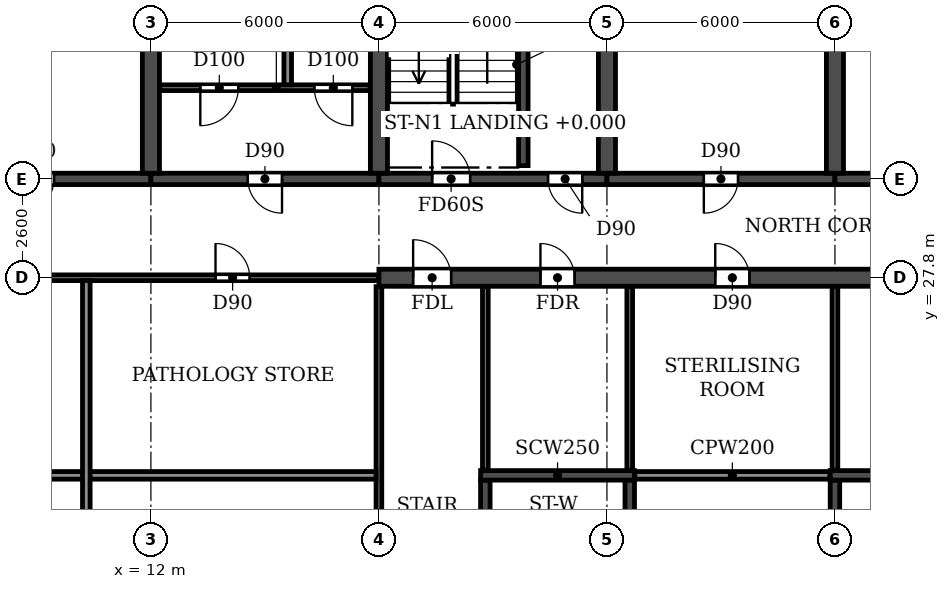
"""IFC4 building model, lengths in metres.
Left out: names, types, materials, properties, quantities, classifications, styles, units other than length and angle.
Written with IfcOpenShell. Run it as: python <this file> out.ifc"""

import sys

from ifc_helpers import new_model, si_unit, direction, frame, frame_2d, origin, place, context, subcontext, project, spatial, rectangle, extrude, element, fill, save


model = new_model("IFC4")
c1 = context("Model", 3, precision=1e-05, world=origin(), true_north=direction((0.0, 1.0)))
c2 = subcontext(c1, "Body", "Model", "MODEL_VIEW")
j1 = project(units=[si_unit("LENGTHUNIT", "METRE"), si_unit("PLANEANGLEUNIT", "RADIAN")], contexts=[c1])
p1 = place(None, origin())
s1 = spatial("IfcSite", under=j1, at=p1, CompositionType="ELEMENT")
p2 = place(p1, origin())
s2 = spatial("IfcBuilding", under=s1, at=p2, CompositionType="ELEMENT")
p3 = place(p2, frame((0.0, 0.0, 6.0)))
s3 = spatial("IfcBuildingStorey", under=s2, at=p3, CompositionType="ELEMENT", Elevation=6.0)
for number, where, z_axis, x_axis in (
    (1, (12.0, 30.55, 0.0), (0.0, 0.0, 1.0), (0.0, 1.0, 0.0)),
    (2, (18.0, 30.55, 0.0), (0.0, 0.0, 1.0), (0.0, 1.0, 0.0)),
    (3, (24.0, 30.55, 0.0), (0.0, 0.0, 1.0), (0.0, 1.0, 0.0)),
    (4, (30.0, 30.55, 0.0), (0.0, 0.0, 1.0), (0.0, 1.0, 0.0)),
):
    element("IfcWall", number, at=place(p3, frame(where, z_axis=z_axis, x_axis=x_axis)), inside=s3, PredefinedType="SHEAR", context=c2, shape_type="SweptSolid", body=[
        extrude(rectangle(XDim=14.05, YDim=0.45, at=frame_2d((7.025, 0.0))), origin(), (0.0, 0.0, 1.0), 4.52),
    ])
p4 = place(p3, frame((6.0, 30.4, 0.0), z_axis=(0.0, 0.0, 1.0), x_axis=(1.0, 0.0, 0.0)))
e5 = element("IfcWall", 5, at=p4, inside=s3, PredefinedType="SHEAR", context=c2, shape_type="SweptSolid", body=[
    extrude(rectangle(XDim=6.0, YDim=0.3, at=frame_2d((3.0, 0.0))), origin(), (0.0, 0.0, 1.0), 3.92),
])
p5 = place(p4, frame((2.55, 0.0, 0.0)))
e6 = element("IfcOpeningElement", 6, at=p5, cuts=e5, PredefinedType="OPENING", context=c2, shape_type="SweptSolid", body=[
    extrude(rectangle(XDim=0.9, YDim=2.1, at=frame_2d((0.45, 1.05))), frame((0.0, 0.16, 0.0), z_axis=(0.0, -1.0, 0.0), x_axis=(1.0, 0.0, 0.0)), (0.0, 0.0, 1.0), 0.32),
])
p6 = place(p3, frame((12.0, 30.4, 0.0), z_axis=(0.0, 0.0, 1.0), x_axis=(1.0, 0.0, 0.0)))
e7 = element("IfcWall", 7, at=p6, inside=s3, PredefinedType="SHEAR", context=c2, shape_type="SweptSolid", body=[
    extrude(rectangle(XDim=6.0, YDim=0.3, at=frame_2d((3.0, 0.0))), origin(), (0.0, 0.0, 1.0), 3.92),
])
p7 = place(p6, frame((2.55, 0.0, 0.0)))
e8 = element("IfcOpeningElement", 8, at=p7, cuts=e7, PredefinedType="OPENING", context=c2, shape_type="SweptSolid", body=[
    extrude(rectangle(XDim=0.9, YDim=2.1, at=frame_2d((0.45, 1.05))), frame((0.0, 0.16, 0.0), z_axis=(0.0, -1.0, 0.0), x_axis=(1.0, 0.0, 0.0)), (0.0, 0.0, 1.0), 0.32),
])
p8 = place(p3, frame((18.0, 30.4, 0.0), z_axis=(0.0, 0.0, 1.0), x_axis=(1.0, 0.0, 0.0)))
e9 = element("IfcWall", 9, at=p8, inside=s3, PredefinedType="SHEAR", context=c2, shape_type="SweptSolid", body=[
    extrude(rectangle(XDim=6.0, YDim=0.3, at=frame_2d((3.0, 0.0))), origin(), (0.0, 0.0, 1.0), 3.92),
])
p9 = place(p8, frame((1.4, 0.0, 0.0)))
e10 = element("IfcOpeningElement", 10, at=p9, cuts=e9, PredefinedType="OPENING", context=c2, shape_type="SweptSolid", body=[
    extrude(rectangle(XDim=1.0, YDim=2.1, at=frame_2d((0.5, 1.05))), frame((0.0, 0.16, 0.0), z_axis=(0.0, -1.0, 0.0), x_axis=(1.0, 0.0, 0.0)), (0.0, 0.0, 1.0), 0.32),
])
p10 = place(p8, frame((4.45, 0.0, 0.0)))
e11 = element("IfcOpeningElement", 11, at=p10, cuts=e9, PredefinedType="OPENING", context=c2, shape_type="SweptSolid", body=[
    extrude(rectangle(XDim=0.9, YDim=2.1, at=frame_2d((0.45, 1.05))), frame((0.0, 0.16, 0.0), z_axis=(0.0, -1.0, 0.0), x_axis=(1.0, 0.0, 0.0)), (0.0, 0.0, 1.0), 0.32),
])
p11 = place(p3, frame((24.0, 30.4, 0.0), z_axis=(0.0, 0.0, 1.0), x_axis=(1.0, 0.0, 0.0)))
e12 = element("IfcWall", 12, at=p11, inside=s3, PredefinedType="SHEAR", context=c2, shape_type="SweptSolid", body=[
    extrude(rectangle(XDim=6.0, YDim=0.3, at=frame_2d((3.0, 0.0))), origin(), (0.0, 0.0, 1.0), 3.92),
])
p12 = place(p11, frame((2.55, 0.0, 0.0)))
e13 = element("IfcOpeningElement", 13, at=p12, cuts=e12, PredefinedType="OPENING", context=c2, shape_type="SweptSolid", body=[
    extrude(rectangle(XDim=0.9, YDim=2.1, at=frame_2d((0.45, 1.05))), frame((0.0, 0.16, 0.0), z_axis=(0.0, -1.0, 0.0), x_axis=(1.0, 0.0, 0.0)), (0.0, 0.0, 1.0), 0.32),
])
p13 = place(p3, frame((30.0, 30.4, 0.0), z_axis=(0.0, 0.0, 1.0), x_axis=(1.0, 0.0, 0.0)))
e14 = element("IfcWall", 14, at=p13, inside=s3, PredefinedType="SHEAR", context=c2, shape_type="SweptSolid", body=[
    extrude(rectangle(XDim=6.0, YDim=0.3, at=frame_2d((3.0, 0.0))), origin(), (0.0, 0.0, 1.0), 3.92),
])
p14 = place(p13, frame((2.55, 0.0, 0.0)))
e15 = element("IfcOpeningElement", 15, at=p14, cuts=e14, PredefinedType="OPENING", context=c2, shape_type="SweptSolid", body=[
    extrude(rectangle(XDim=0.9, YDim=2.1, at=frame_2d((0.45, 1.05))), frame((0.0, 0.16, 0.0), z_axis=(0.0, -1.0, 0.0), x_axis=(1.0, 0.0, 0.0)), (0.0, 0.0, 1.0), 0.32),
])
p15 = place(p3, frame((18.0, 27.8, 0.0), z_axis=(0.0, 0.0, 1.0), x_axis=(1.0, 0.0, 0.0)))
e16 = element("IfcWall", 16, at=p15, inside=s3, PredefinedType="SOLIDWALL", context=c2, shape_type="SweptSolid", body=[
    extrude(rectangle(XDim=66.0, YDim=0.45, at=frame_2d((33.0, 0.0))), origin(), (0.0, 0.0, 1.0), 4.52),
])
p16 = place(p15, frame((0.9, 0.0, 0.0)))
e17 = element("IfcOpeningElement", 17, at=p16, cuts=e16, PredefinedType="OPENING", context=c2, shape_type="SweptSolid", body=[
    extrude(rectangle(XDim=1.0, YDim=2.1, at=frame_2d((0.5, 1.05))), frame((0.0, 0.235, 0.0), z_axis=(0.0, -1.0, 0.0), x_axis=(1.0, 0.0, 0.0)), (0.0, 0.0, 1.0), 0.47),
])
p17 = place(p15, frame((4.25, 0.0, 0.0)))
e18 = element("IfcOpeningElement", 18, at=p17, cuts=e16, PredefinedType="OPENING", context=c2, shape_type="SweptSolid", body=[
    extrude(rectangle(XDim=0.9, YDim=2.1, at=frame_2d((0.45, 1.05))), frame((0.0, 0.235, 0.0), z_axis=(0.0, -1.0, 0.0), x_axis=(1.0, 0.0, 0.0)), (0.0, 0.0, 1.0), 0.47),
])
p18 = place(p15, frame((8.85, 0.0, 0.0)))
e19 = element("IfcOpeningElement", 19, at=p18, cuts=e16, PredefinedType="OPENING", context=c2, shape_type="SweptSolid", body=[
    extrude(rectangle(XDim=0.9, YDim=2.1, at=frame_2d((0.45, 1.05))), frame((0.0, 0.235, 0.0), z_axis=(0.0, -1.0, 0.0), x_axis=(1.0, 0.0, 0.0)), (0.0, 0.0, 1.0), 0.47),
])
p19 = place(p15, frame((13.45, 0.0, 0.0)))
e20 = element("IfcOpeningElement", 20, at=p19, cuts=e16, PredefinedType="OPENING", context=c2, shape_type="SweptSolid", body=[
    extrude(rectangle(XDim=0.9, YDim=2.1, at=frame_2d((0.45, 1.05))), frame((0.0, 0.235, 0.0), z_axis=(0.0, -1.0, 0.0), x_axis=(1.0, 0.0, 0.0)), (0.0, 0.0, 1.0), 0.47),
])
p20 = place(p15, frame((17.9, 0.0, 0.0)))
e21 = element("IfcOpeningElement", 21, at=p20, cuts=e16, PredefinedType="OPENING", context=c2, shape_type="SweptSolid", body=[
    extrude(rectangle(XDim=1.0, YDim=2.1, at=frame_2d((0.5, 1.05))), frame((0.0, 0.235, 0.0), z_axis=(0.0, -1.0, 0.0), x_axis=(1.0, 0.0, 0.0)), (0.0, 0.0, 1.0), 0.47),
])
p21 = place(p15, frame((23.1, 0.0, 0.0)))
e22 = element("IfcOpeningElement", 22, at=p21, cuts=e16, PredefinedType="OPENING", context=c2, shape_type="SweptSolid", body=[
    extrude(rectangle(XDim=1.0, YDim=2.1, at=frame_2d((0.5, 1.05))), frame((0.0, 0.235, 0.0), z_axis=(0.0, -1.0, 0.0), x_axis=(1.0, 0.0, 0.0)), (0.0, 0.0, 1.0), 0.47),
])
p22 = place(p15, frame((29.6, 0.0, 0.0)))
e23 = element("IfcOpeningElement", 23, at=p22, cuts=e16, PredefinedType="OPENING", context=c2, shape_type="SweptSolid", body=[
    extrude(rectangle(XDim=1.0, YDim=2.1, at=frame_2d((0.5, 1.05))), frame((0.0, 0.235, 0.0), z_axis=(0.0, -1.0, 0.0), x_axis=(1.0, 0.0, 0.0)), (0.0, 0.0, 1.0), 0.47),
])
p23 = place(p15, frame((32.5, 0.0, 0.0)))
e24 = element("IfcOpeningElement", 24, at=p23, cuts=e16, PredefinedType="OPENING", context=c2, shape_type="SweptSolid", body=[
    extrude(rectangle(XDim=1.0, YDim=2.1, at=frame_2d((0.5, 1.05))), frame((0.0, 0.235, 0.0), z_axis=(0.0, -1.0, 0.0), x_axis=(1.0, 0.0, 0.0)), (0.0, 0.0, 1.0), 0.47),
])
p24 = place(p15, frame((38.0, 0.0, 0.0)))
e25 = element("IfcOpeningElement", 25, at=p24, cuts=e16, PredefinedType="OPENING", context=c2, shape_type="SweptSolid", body=[
    extrude(rectangle(XDim=1.0, YDim=2.1, at=frame_2d((0.5, 1.05))), frame((0.0, 0.235, 0.0), z_axis=(0.0, -1.0, 0.0), x_axis=(1.0, 0.0, 0.0)), (0.0, 0.0, 1.0), 0.47),
])
p25 = place(p15, frame((43.2, 0.0, 0.0)))
e26 = element("IfcOpeningElement", 26, at=p25, cuts=e16, PredefinedType="OPENING", context=c2, shape_type="SweptSolid", body=[
    extrude(rectangle(XDim=1.0, YDim=2.1, at=frame_2d((0.5, 1.05))), frame((0.0, 0.235, 0.0), z_axis=(0.0, -1.0, 0.0), x_axis=(1.0, 0.0, 0.0)), (0.0, 0.0, 1.0), 0.47),
])
p26 = place(p15, frame((45.8, 0.0, 0.0)))
e27 = element("IfcOpeningElement", 27, at=p26, cuts=e16, PredefinedType="OPENING", context=c2, shape_type="SweptSolid", body=[
    extrude(rectangle(XDim=1.0, YDim=2.1, at=frame_2d((0.5, 1.05))), frame((0.0, 0.235, 0.0), z_axis=(0.0, -1.0, 0.0), x_axis=(1.0, 0.0, 0.0)), (0.0, 0.0, 1.0), 0.47),
])
p27 = place(p15, frame((48.4, 0.0, 0.0)))
e28 = element("IfcOpeningElement", 28, at=p27, cuts=e16, PredefinedType="OPENING", context=c2, shape_type="SweptSolid", body=[
    extrude(rectangle(XDim=1.0, YDim=2.1, at=frame_2d((0.5, 1.05))), frame((0.0, 0.235, 0.0), z_axis=(0.0, -1.0, 0.0), x_axis=(1.0, 0.0, 0.0)), (0.0, 0.0, 1.0), 0.47),
])
p28 = place(p15, frame((51.65, 0.0, 0.0)))
e29 = element("IfcOpeningElement", 29, at=p28, cuts=e16, PredefinedType="OPENING", context=c2, shape_type="SweptSolid", body=[
    extrude(rectangle(XDim=0.9, YDim=2.1, at=frame_2d((0.45, 1.05))), frame((0.0, 0.235, 0.0), z_axis=(0.0, -1.0, 0.0), x_axis=(1.0, 0.0, 0.0)), (0.0, 0.0, 1.0), 0.47),
])
p29 = place(p15, frame((56.25, 0.0, 0.0)))
e30 = element("IfcOpeningElement", 30, at=p29, cuts=e16, PredefinedType="OPENING", context=c2, shape_type="SweptSolid", body=[
    extrude(rectangle(XDim=0.9, YDim=2.1, at=frame_2d((0.45, 1.05))), frame((0.0, 0.235, 0.0), z_axis=(0.0, -1.0, 0.0), x_axis=(1.0, 0.0, 0.0)), (0.0, 0.0, 1.0), 0.47),
])
p30 = place(p15, frame((60.85, 0.0, 0.0)))
e31 = element("IfcOpeningElement", 31, at=p30, cuts=e16, PredefinedType="OPENING", context=c2, shape_type="SweptSolid", body=[
    extrude(rectangle(XDim=0.9, YDim=2.1, at=frame_2d((0.45, 1.05))), frame((0.0, 0.235, 0.0), z_axis=(0.0, -1.0, 0.0), x_axis=(1.0, 0.0, 0.0)), (0.0, 0.0, 1.0), 0.47),
])
p31 = place(p15, frame((64.1, 0.0, 0.0)))
e32 = element("IfcOpeningElement", 32, at=p31, cuts=e16, PredefinedType="OPENING", context=c2, shape_type="SweptSolid", body=[
    extrude(rectangle(XDim=1.0, YDim=2.1, at=frame_2d((0.5, 1.05))), frame((0.0, 0.235, 0.0), z_axis=(0.0, -1.0, 0.0), x_axis=(1.0, 0.0, 0.0)), (0.0, 0.0, 1.0), 0.47),
])
p32 = place(p3, frame((30.0, 14.825, 0.0), z_axis=(0.0, 0.0, 1.0), x_axis=(0.0, 1.0, 0.0)))
e33 = element("IfcWall", 33, at=p32, inside=s3, PredefinedType="SOLIDWALL", context=c2, shape_type="SweptSolid", body=[
    extrude(rectangle(XDim=7.65, YDim=0.25, at=frame_2d((3.825, 0.0))), origin(), (0.0, 0.0, 1.0), 4.52),
])
p33 = place(p3, frame((29.875, 22.6, 0.0), z_axis=(0.0, 0.0, 1.0), x_axis=(1.0, 0.0, 0.0)))
e34 = element("IfcWall", 34, at=p33, inside=s3, PredefinedType="SOLIDWALL", context=c2, shape_type="SweptSolid", body=[
    extrude(rectangle(XDim=4.05, YDim=0.25, at=frame_2d((2.025, 0.0))), origin(), (0.0, 0.0, 1.0), 4.52),
])
p34 = place(p3, frame((20.8, 14.825, 0.0), z_axis=(0.0, 0.0, 1.0), x_axis=(0.0, 1.0, 0.0)))
e35 = element("IfcWall", 35, at=p34, inside=s3, PredefinedType="SOLIDWALL", context=c2, shape_type="SweptSolid", body=[
    extrude(rectangle(XDim=7.65, YDim=0.25, at=frame_2d((3.825, 0.0))), origin(), (0.0, 0.0, 1.0), 4.52),
])
p35 = place(p34, frame((0.475, 0.0, 0.0)))
e36 = element("IfcOpeningElement", 36, at=p35, cuts=e35, PredefinedType="OPENING", context=c2, shape_type="SweptSolid", body=[
    extrude(rectangle(XDim=1.0, YDim=2.1, at=frame_2d((0.5, 1.05))), frame((0.0, 0.135, 0.0), z_axis=(0.0, -1.0, 0.0), x_axis=(1.0, 0.0, 0.0)), (0.0, 0.0, 1.0), 0.27),
])
p36 = place(p3, frame((24.6, 14.825, 0.0), z_axis=(0.0, 0.0, 1.0), x_axis=(0.0, 1.0, 0.0)))
e37 = element("IfcWall", 37, at=p36, inside=s3, PredefinedType="SOLIDWALL", context=c2, shape_type="SweptSolid", body=[
    extrude(rectangle(XDim=7.65, YDim=0.25, at=frame_2d((3.825, 0.0))), origin(), (0.0, 0.0, 1.0), 4.52),
])
p37 = place(p3, frame((20.675, 22.6, 0.0), z_axis=(0.0, 0.0, 1.0), x_axis=(1.0, 0.0, 0.0)))
e38 = element("IfcWall", 38, at=p37, inside=s3, PredefinedType="SOLIDWALL", context=c2, shape_type="SweptSolid", body=[
    extrude(rectangle(XDim=4.05, YDim=0.25, at=frame_2d((2.025, 0.0))), origin(), (0.0, 0.0, 1.0), 4.52),
])
p38 = place(p3, frame((21.8, 30.75, 0.0), z_axis=(0.0, 0.0, 1.0), x_axis=(0.0, 1.0, 0.0)))
e39 = element("IfcWall", 39, at=p38, inside=s3, PredefinedType="SOLIDWALL", context=c2, shape_type="SweptSolid", body=[
    extrude(rectangle(XDim=7.525, YDim=0.25, at=frame_2d((3.762, 0.0))), origin(), (0.0, 0.0, 1.0), 4.52),
])
p39 = place(p3, frame((2.525, 27.8, 0.0), z_axis=(0.0, 0.0, 1.0), x_axis=(1.0, 0.0, 0.0)))
e40 = element("IfcWall", 40, at=p39, inside=s3, PredefinedType="PARTITIONING", context=c2, shape_type="SweptSolid", body=[
    extrude(rectangle(XDim=15.465, YDim=0.15, at=frame_2d((7.732, 0.0))), origin(), (0.0, 0.0, 1.0), 4.52),
])
p40 = place(p39, frame((3.475, 0.0, 0.0)))
e41 = element("IfcOpeningElement", 41, at=p40, cuts=e40, PredefinedType="OPENING", context=c2, shape_type="SweptSolid", body=[
    extrude(rectangle(XDim=0.9, YDim=2.1, at=frame_2d((0.45, 1.05))), frame((0.0, 0.085, 0.0), z_axis=(0.0, -1.0, 0.0), x_axis=(1.0, 0.0, 0.0)), (0.0, 0.0, 1.0), 0.17),
])
p41 = place(p39, frame((11.175, 0.0, 0.0)))
e42 = element("IfcOpeningElement", 42, at=p41, cuts=e40, PredefinedType="OPENING", context=c2, shape_type="SweptSolid", body=[
    extrude(rectangle(XDim=0.9, YDim=2.1, at=frame_2d((0.45, 1.05))), frame((0.0, 0.085, 0.0), z_axis=(0.0, -1.0, 0.0), x_axis=(1.0, 0.0, 0.0)), (0.0, 0.0, 1.0), 0.17),
])
p42 = place(p3, frame((12.235, 32.8, 0.0), z_axis=(0.0, 0.0, 1.0), x_axis=(1.0, 0.0, 0.0)))
e43 = element("IfcWall", 43, at=p42, inside=s3, PredefinedType="PARTITIONING", context=c2, shape_type="SweptSolid", body=[
    extrude(rectangle(XDim=5.53, YDim=0.15, at=frame_2d((2.765, 0.0))), origin(), (0.0, 0.0, 1.0), 4.52),
])
p43 = place(p42, frame((1.065, 0.0, 0.0)))
e44 = element("IfcOpeningElement", 44, at=p43, cuts=e43, PredefinedType="OPENING", context=c2, shape_type="SweptSolid", body=[
    extrude(rectangle(XDim=1.0, YDim=2.1, at=frame_2d((0.5, 1.05))), frame((0.0, 0.085, 0.0), z_axis=(0.0, -1.0, 0.0), x_axis=(1.0, 0.0, 0.0)), (0.0, 0.0, 1.0), 0.17),
])
p44 = place(p42, frame((4.065, 0.0, 0.0)))
e45 = element("IfcOpeningElement", 45, at=p44, cuts=e43, PredefinedType="OPENING", context=c2, shape_type="SweptSolid", body=[
    extrude(rectangle(XDim=1.0, YDim=2.1, at=frame_2d((0.5, 1.05))), frame((0.0, 0.085, 0.0), z_axis=(0.0, -1.0, 0.0), x_axis=(1.0, 0.0, 0.0)), (0.0, 0.0, 1.0), 0.17),
])
p45 = place(p3, frame((18.0, 14.835, 0.0), z_axis=(0.0, 0.0, 1.0), x_axis=(0.0, 1.0, 0.0)))
e46 = element("IfcWall", 46, at=p45, inside=s3, PredefinedType="PARTITIONING", context=c2, shape_type="SweptSolid", body=[
    extrude(rectangle(XDim=12.73, YDim=0.15, at=frame_2d((6.365, 0.0))), origin(), (0.0, 0.0, 1.0), 4.52),
])
p46 = place(p3, frame((2.675, 22.6, 0.0), z_axis=(0.0, 0.0, 1.0), x_axis=(1.0, 0.0, 0.0)))
e47 = element("IfcWall", 47, at=p46, inside=s3, PredefinedType="PARTITIONING", context=c2, shape_type="SweptSolid", body=[
    extrude(rectangle(XDim=15.25, YDim=0.2, at=frame_2d((7.625, 0.0))), origin(), (0.0, 0.0, 1.0), 4.52),
])
p47 = place(p3, frame((24.735, 22.6, 0.0), z_axis=(0.0, 0.0, 1.0), x_axis=(1.0, 0.0, 0.0)))
e48 = element("IfcWall", 48, at=p47, inside=s3, PredefinedType="PARTITIONING", context=c2, shape_type="SweptSolid", body=[
    extrude(rectangle(XDim=5.13, YDim=0.2, at=frame_2d((2.565, 0.0))), origin(), (0.0, 0.0, 1.0), 4.52),
])
p48 = place(p3, frame((10.3, 14.675, 0.0), z_axis=(0.0, 0.0, 1.0), x_axis=(0.0, 1.0, 0.0)))
e49 = element("IfcWall", 49, at=p48, inside=s3, PredefinedType="PARTITIONING", context=c2, shape_type="SweptSolid", body=[
    extrude(rectangle(XDim=13.05, YDim=0.2, at=frame_2d((6.525, 0.0))), origin(), (0.0, 0.0, 1.0), 4.52),
])
p49 = place(p3, frame((15.6, 32.875, 0.0), z_axis=(0.0, 0.0, 1.0), x_axis=(0.0, 1.0, 0.0)))
e50 = element("IfcWall", 50, at=p49, inside=s3, PredefinedType="PARTITIONING", context=c2, shape_type="SweptSolid", body=[
    extrude(rectangle(XDim=11.825, YDim=0.2, at=frame_2d((5.913, 0.0))), origin(), (0.0, 0.0, 1.0), 4.52),
])
for number, where, z_axis, x_axis in (
    (51, (20.8, 22.735, 0.0), (0.0, 0.0, 1.0), (0.0, 1.0, 0.0)),
    (52, (24.6, 22.735, 0.0), (0.0, 0.0, 1.0), (0.0, 1.0, 0.0)),
    (53, (30.0, 22.735, 0.0), (0.0, 0.0, 1.0), (0.0, 1.0, 0.0)),
):
    element("IfcWall", number, at=place(p3, frame(where, z_axis=z_axis, x_axis=x_axis)), inside=s3, PredefinedType="PARTITIONING", context=c2, shape_type="SweptSolid", body=[
        extrude(rectangle(XDim=4.83, YDim=0.15, at=frame_2d((2.415, 0.0))), origin(), (0.0, 0.0, 1.0), 4.52),
    ])
p50 = place(p5, frame((0.9, 0.0, 0.0), z_axis=(0.0, 0.0, 1.0), x_axis=(-1.0, 0.0, 0.0)))
e54 = element("IfcDoor", 54, at=p50, inside=s3, OperationType="SINGLE_SWING_RIGHT", PredefinedType="DOOR", context=c2, shape_type="SweptSolid", body=[
    extrude(rectangle(XDim=0.9, YDim=2.1, at=frame_2d((0.45, 1.05))), frame((0.0, 0.025, 0.0), z_axis=(0.0, -1.0, 0.0), x_axis=(1.0, 0.0, 0.0)), (0.0, 0.0, 1.0), 0.05),
])
fill(e6, e54)
p51 = place(p41, origin())
e55 = element("IfcDoor", 55, at=p51, inside=s3, OperationType="SINGLE_SWING_LEFT", PredefinedType="DOOR", context=c2, shape_type="SweptSolid", body=[
    extrude(rectangle(XDim=0.9, YDim=2.1, at=frame_2d((0.45, 1.05))), frame((0.0, 0.025, 0.0), z_axis=(0.0, -1.0, 0.0), x_axis=(1.0, 0.0, 0.0)), (0.0, 0.0, 1.0), 0.05),
])
fill(e42, e55)
p52 = place(p7, frame((0.9, 0.0, 0.0), z_axis=(0.0, 0.0, 1.0), x_axis=(-1.0, 0.0, 0.0)))
e56 = element("IfcDoor", 56, at=p52, inside=s3, OperationType="SINGLE_SWING_LEFT", PredefinedType="DOOR", context=c2, shape_type="SweptSolid", body=[
    extrude(rectangle(XDim=0.9, YDim=2.1, at=frame_2d((0.45, 1.05))), frame((0.0, 0.025, 0.0), z_axis=(0.0, -1.0, 0.0), x_axis=(1.0, 0.0, 0.0)), (0.0, 0.0, 1.0), 0.05),
])
fill(e8, e56)
p53 = place(p16, origin())
e57 = element("IfcDoor", 57, at=p53, inside=s3, OperationType="SINGLE_SWING_LEFT", PredefinedType="DOOR", context=c2, shape_type="SweptSolid", body=[
    extrude(rectangle(XDim=1.0, YDim=2.1, at=frame_2d((0.5, 1.05))), frame((0.0, 0.025, 0.0), z_axis=(0.0, -1.0, 0.0), x_axis=(1.0, 0.0, 0.0)), (0.0, 0.0, 1.0), 0.05),
])
fill(e17, e57)
p54 = place(p9, origin())
e58 = element("IfcDoor", 58, at=p54, inside=s3, OperationType="SINGLE_SWING_LEFT", PredefinedType="DOOR", context=c2, shape_type="SweptSolid", body=[
    extrude(rectangle(XDim=1.0, YDim=2.1, at=frame_2d((0.5, 1.05))), frame((0.0, 0.025, 0.0), z_axis=(0.0, -1.0, 0.0), x_axis=(1.0, 0.0, 0.0)), (0.0, 0.0, 1.0), 0.05),
])
fill(e10, e58)
p55 = place(p17, origin())
e59 = element("IfcDoor", 59, at=p55, inside=s3, OperationType="SINGLE_SWING_LEFT", PredefinedType="DOOR", context=c2, shape_type="SweptSolid", body=[
    extrude(rectangle(XDim=0.9, YDim=2.1, at=frame_2d((0.45, 1.05))), frame((0.0, 0.025, 0.0), z_axis=(0.0, -1.0, 0.0), x_axis=(1.0, 0.0, 0.0)), (0.0, 0.0, 1.0), 0.05),
])
fill(e18, e59)
p56 = place(p10, frame((0.9, 0.0, 0.0), z_axis=(0.0, 0.0, 1.0), x_axis=(-1.0, 0.0, 0.0)))
e60 = element("IfcDoor", 60, at=p56, inside=s3, OperationType="SINGLE_SWING_LEFT", PredefinedType="DOOR", context=c2, shape_type="SweptSolid", body=[
    extrude(rectangle(XDim=0.9, YDim=2.1, at=frame_2d((0.45, 1.05))), frame((0.0, 0.025, 0.0), z_axis=(0.0, -1.0, 0.0), x_axis=(1.0, 0.0, 0.0)), (0.0, 0.0, 1.0), 0.05),
])
fill(e11, e60)
p57 = place(p12, frame((0.9, 0.0, 0.0), z_axis=(0.0, 0.0, 1.0), x_axis=(-1.0, 0.0, 0.0)))
e61 = element("IfcDoor", 61, at=p57, inside=s3, OperationType="SINGLE_SWING_RIGHT", PredefinedType="DOOR", context=c2, shape_type="SweptSolid", body=[
    extrude(rectangle(XDim=0.9, YDim=2.1, at=frame_2d((0.45, 1.05))), frame((0.0, 0.025, 0.0), z_axis=(0.0, -1.0, 0.0), x_axis=(1.0, 0.0, 0.0)), (0.0, 0.0, 1.0), 0.05),
])
fill(e13, e61)
p58 = place(p18, origin())
e62 = element("IfcDoor", 62, at=p58, inside=s3, OperationType="SINGLE_SWING_LEFT", PredefinedType="DOOR", context=c2, shape_type="SweptSolid", body=[
    extrude(rectangle(XDim=0.9, YDim=2.1, at=frame_2d((0.45, 1.05))), frame((0.0, 0.025, 0.0), z_axis=(0.0, -1.0, 0.0), x_axis=(1.0, 0.0, 0.0)), (0.0, 0.0, 1.0), 0.05),
])
fill(e19, e62)
p59 = place(p43, frame((1.0, 0.0, 0.0), z_axis=(0.0, 0.0, 1.0), x_axis=(-1.0, 0.0, 0.0)))
e63 = element("IfcDoor", 63, at=p59, inside=s3, OperationType="SINGLE_SWING_RIGHT", PredefinedType="DOOR", context=c2, shape_type="SweptSolid", body=[
    extrude(rectangle(XDim=1.0, YDim=2.1, at=frame_2d((0.5, 1.05))), frame((0.0, 0.025, 0.0), z_axis=(0.0, -1.0, 0.0), x_axis=(1.0, 0.0, 0.0)), (0.0, 0.0, 1.0), 0.05),
])
fill(e44, e63)
p60 = place(p44, frame((1.0, 0.0, 0.0), z_axis=(0.0, 0.0, 1.0), x_axis=(-1.0, 0.0, 0.0)))
e64 = element("IfcDoor", 64, at=p60, inside=s3, OperationType="SINGLE_SWING_LEFT", PredefinedType="DOOR", context=c2, shape_type="SweptSolid", body=[
    extrude(rectangle(XDim=1.0, YDim=2.1, at=frame_2d((0.5, 1.05))), frame((0.0, 0.025, 0.0), z_axis=(0.0, -1.0, 0.0), x_axis=(1.0, 0.0, 0.0)), (0.0, 0.0, 1.0), 0.05),
])
fill(e45, e64)
save(model, sys.argv[1])
